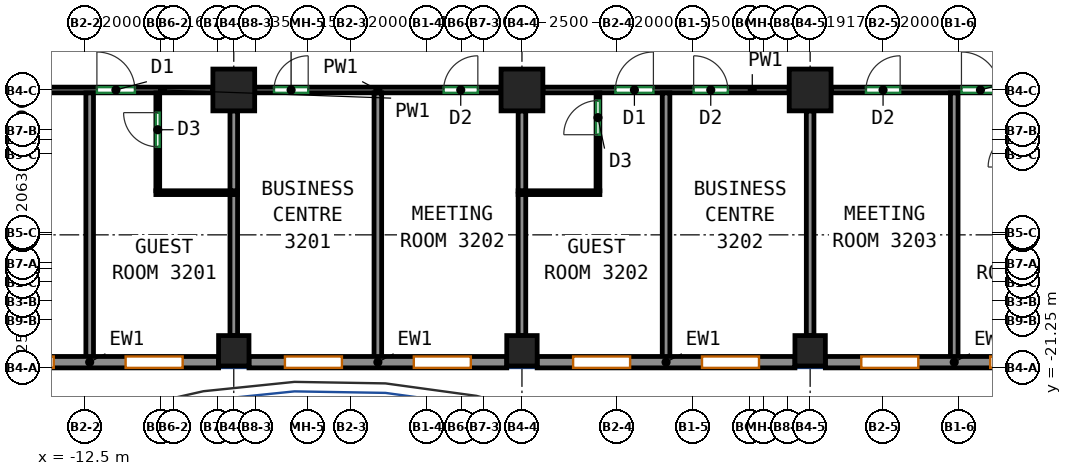
"""IFC4 building model, lengths in metres.
Left out: names, types, materials, properties, quantities, classifications, styles, units other than length and angle.
Written with IfcOpenShell. Run it as: python <this file> out.ifc"""

import sys

from ifc_helpers import new_model, si_unit, direction, frame, frame_2d, origin, origin_2d, place, context, subcontext, project, spatial, rectangle, extrude, source, transform, mapped, element, fill, save


model = new_model("IFC4")
c1 = context("Model", 3, precision=1e-05, world=origin(), true_north=direction((0.0, 1.0)))
c2 = subcontext(c1, "Body", "Model", "MODEL_VIEW")
j1 = project(units=[si_unit("LENGTHUNIT", "METRE"), si_unit("PLANEANGLEUNIT", "RADIAN")], contexts=[c1])
p1 = place(None, origin())
s1 = spatial("IfcSite", under=j1, at=p1, CompositionType="ELEMENT")
p2 = place(p1, origin())
s2 = spatial("IfcBuilding", under=s1, at=p2, CompositionType="ELEMENT")
p3 = place(p2, frame((0.0, 0.0, 143.9)))
s3 = spatial("IfcBuildingStorey", under=s2, at=p3, CompositionType="ELEMENT", Elevation=143.9)
m1 = source(origin(), c2, "Body", "SweptSolid", [
    extrude(rectangle(XDim=0.8, YDim=0.8, at=origin_2d()), origin(), (0.0, 0.0, 1.0), 3.12),
])
p4 = place(p3, frame((-8.583, -20.8, 0.0), z_axis=(0.0, 0.0, 1.0), x_axis=(1.0, 0.0, 0.0)))
e1 = element("IfcColumn", 1, at=p4, inside=s3, PredefinedType="COLUMN", context=c2, shape_type="MappedRepresentation", body=[
    mapped(m1, transform((0.0, 0.0, 0.0))),
])
m2 = source(origin(), c2, "Body", "SweptSolid", [
    extrude(rectangle(XDim=1.1, YDim=1.1, at=origin_2d()), origin(), (0.0, 0.0, 1.0), 3.12),
])
p5 = place(p3, frame((-8.583, -13.938, 0.0), z_axis=(0.0, 0.0, 1.0), x_axis=(1.0, 0.0, 0.0)))
e2 = element("IfcColumn", 2, at=p5, inside=s3, PredefinedType="COLUMN", context=c2, shape_type="MappedRepresentation", body=[
    mapped(m2, transform((0.0, 0.0, 0.0))),
])
p6 = place(p3, frame((-1.0, -20.8, 0.0), z_axis=(0.0, 0.0, 1.0), x_axis=(1.0, 0.0, 0.0)))
e3 = element("IfcColumn", 3, at=p6, inside=s3, PredefinedType="COLUMN", context=c2, shape_type="MappedRepresentation", body=[
    mapped(m1, transform((0.0, 0.0, 0.0))),
])
p7 = place(p3, frame((-1.0, -13.938, 0.0), z_axis=(0.0, 0.0, 1.0), x_axis=(1.0, 0.0, 0.0)))
e4 = element("IfcColumn", 4, at=p7, inside=s3, PredefinedType="COLUMN", context=c2, shape_type="MappedRepresentation", body=[
    mapped(m2, transform((0.0, 0.0, 0.0))),
])
p8 = place(p3, frame((6.583, -20.8, 0.0), z_axis=(0.0, 0.0, 1.0), x_axis=(1.0, 0.0, 0.0)))
e5 = element("IfcColumn", 5, at=p8, inside=s3, PredefinedType="COLUMN", context=c2, shape_type="MappedRepresentation", body=[
    mapped(m1, transform((0.0, 0.0, 0.0))),
])
p9 = place(p3, frame((6.583, -13.938, 0.0), z_axis=(0.0, 0.0, 1.0), x_axis=(1.0, 0.0, 0.0)))
e6 = element("IfcColumn", 6, at=p9, inside=s3, PredefinedType="COLUMN", context=c2, shape_type="MappedRepresentation", body=[
    mapped(m2, transform((0.0, 0.0, 0.0))),
])
m3 = source(origin(), c2, "Body", "SweptSolid", [
    extrude(rectangle(XDim=6.783, YDim=0.3, at=frame_2d((3.392, 0.0))), origin(), (0.0, 0.0, 1.0), 3.12),
])
p10 = place(p3, frame((-15.767, -21.1, 0.0), z_axis=(0.0, 0.0, 1.0), x_axis=(1.0, 0.0, 0.0)))
e7 = element("IfcWall", 7, at=p10, inside=s3, PredefinedType="SOLIDWALL", context=c2, shape_type="MappedRepresentation", body=[
    mapped(m3, transform((0.0, 0.0, 0.0))),
])
p11 = place(p10, frame((0.946, 0.0, 0.85)))
e8 = element("IfcOpeningElement", 8, at=p11, cuts=e7, PredefinedType="OPENING", context=c2, shape_type="SweptSolid", body=[
    extrude(rectangle(XDim=1.5, YDim=1.95, at=frame_2d((0.75, 0.975))), frame((0.0, 0.16, 0.0), z_axis=(0.0, -1.0, 0.0), x_axis=(1.0, 0.0, 0.0)), (0.0, 0.0, 1.0), 0.32),
])
p12 = place(p10, frame((4.338, 0.0, 0.85)))
e9 = element("IfcOpeningElement", 9, at=p12, cuts=e7, PredefinedType="OPENING", context=c2, shape_type="SweptSolid", body=[
    extrude(rectangle(XDim=1.5, YDim=1.95, at=frame_2d((0.75, 0.975))), frame((0.0, 0.16, 0.0), z_axis=(0.0, -1.0, 0.0), x_axis=(1.0, 0.0, 0.0)), (0.0, 0.0, 1.0), 0.32),
])
m4 = source(origin(), c2, "Body", "SweptSolid", [
    extrude(rectangle(XDim=6.783, YDim=0.3, at=frame_2d((3.392, 0.0))), origin(), (0.0, 0.0, 1.0), 3.12),
])
p13 = place(p3, frame((-8.183, -21.1, 0.0), z_axis=(0.0, 0.0, 1.0), x_axis=(1.0, 0.0, 0.0)))
e10 = element("IfcWall", 10, at=p13, inside=s3, PredefinedType="SOLIDWALL", context=c2, shape_type="MappedRepresentation", body=[
    mapped(m4, transform((0.0, 0.0, 0.0))),
])
p14 = place(p13, frame((0.946, 0.0, 0.85)))
e11 = element("IfcOpeningElement", 11, at=p14, cuts=e10, PredefinedType="OPENING", context=c2, shape_type="SweptSolid", body=[
    extrude(rectangle(XDim=1.5, YDim=1.95, at=frame_2d((0.75, 0.975))), frame((0.0, 0.16, 0.0), z_axis=(0.0, -1.0, 0.0), x_axis=(1.0, 0.0, 0.0)), (0.0, 0.0, 1.0), 0.32),
])
p15 = place(p13, frame((4.337, 0.0, 0.85)))
e12 = element("IfcOpeningElement", 12, at=p15, cuts=e10, PredefinedType="OPENING", context=c2, shape_type="SweptSolid", body=[
    extrude(rectangle(XDim=1.5, YDim=1.95, at=frame_2d((0.75, 0.975))), frame((0.0, 0.16, 0.0), z_axis=(0.0, -1.0, 0.0), x_axis=(1.0, 0.0, 0.0)), (0.0, 0.0, 1.0), 0.32),
])
p16 = place(p3, frame((-0.6, -21.1, 0.0), z_axis=(0.0, 0.0, 1.0), x_axis=(1.0, 0.0, 0.0)))
e13 = element("IfcWall", 13, at=p16, inside=s3, PredefinedType="SOLIDWALL", context=c2, shape_type="MappedRepresentation", body=[
    mapped(m4, transform((0.0, 0.0, 0.0))),
])
p17 = place(p16, frame((0.946, 0.0, 0.85)))
e14 = element("IfcOpeningElement", 14, at=p17, cuts=e13, PredefinedType="OPENING", context=c2, shape_type="SweptSolid", body=[
    extrude(rectangle(XDim=1.5, YDim=1.95, at=frame_2d((0.75, 0.975))), frame((0.0, 0.16, 0.0), z_axis=(0.0, -1.0, 0.0), x_axis=(1.0, 0.0, 0.0)), (0.0, 0.0, 1.0), 0.32),
])
p18 = place(p16, frame((4.337, 0.0, 0.85)))
e15 = element("IfcOpeningElement", 15, at=p18, cuts=e13, PredefinedType="OPENING", context=c2, shape_type="SweptSolid", body=[
    extrude(rectangle(XDim=1.5, YDim=1.95, at=frame_2d((0.75, 0.975))), frame((0.0, 0.16, 0.0), z_axis=(0.0, -1.0, 0.0), x_axis=(1.0, 0.0, 0.0)), (0.0, 0.0, 1.0), 0.32),
])
p19 = place(p3, frame((6.983, -21.1, 0.0), z_axis=(0.0, 0.0, 1.0), x_axis=(1.0, 0.0, 0.0)))
e16 = element("IfcWall", 16, at=p19, inside=s3, PredefinedType="SOLIDWALL", context=c2, shape_type="MappedRepresentation", body=[
    mapped(m3, transform((0.0, 0.0, 0.0))),
])
p20 = place(p19, frame((0.946, 0.0, 0.85)))
e17 = element("IfcOpeningElement", 17, at=p20, cuts=e16, PredefinedType="OPENING", context=c2, shape_type="SweptSolid", body=[
    extrude(rectangle(XDim=1.5, YDim=1.95, at=frame_2d((0.75, 0.975))), frame((0.0, 0.16, 0.0), z_axis=(0.0, -1.0, 0.0), x_axis=(1.0, 0.0, 0.0)), (0.0, 0.0, 1.0), 0.32),
])
p21 = place(p19, frame((4.338, 0.0, 0.85)))
e18 = element("IfcOpeningElement", 18, at=p21, cuts=e16, PredefinedType="OPENING", context=c2, shape_type="SweptSolid", body=[
    extrude(rectangle(XDim=1.5, YDim=1.95, at=frame_2d((0.75, 0.975))), frame((0.0, 0.16, 0.0), z_axis=(0.0, -1.0, 0.0), x_axis=(1.0, 0.0, 0.0)), (0.0, 0.0, 1.0), 0.32),
])
p22 = place(p3, frame((-13.55, -13.938, 0.0), z_axis=(0.0, 0.0, 1.0), x_axis=(1.0, 0.0, 0.0)))
e19 = element("IfcWall", 19, at=p22, inside=s3, PredefinedType="PARTITIONING", context=c2, shape_type="SweptSolid", body=[
    extrude(rectangle(XDim=4.417, YDim=0.15, at=frame_2d((2.208, 0.0))), origin(), (0.0, 0.0, 1.0), 3.12),
])
p23 = place(p22, frame((1.365, 0.0, 0.0)))
e20 = element("IfcOpeningElement", 20, at=p23, cuts=e19, PredefinedType="OPENING", context=c2, shape_type="SweptSolid", body=[
    extrude(rectangle(XDim=1.0, YDim=2.1, at=frame_2d((0.5, 1.05))), frame((0.0, 0.085, 0.0), z_axis=(0.0, -1.0, 0.0), x_axis=(1.0, 0.0, 0.0)), (0.0, 0.0, 1.0), 0.17),
])
p24 = place(p3, frame((-8.033, -13.938, 0.0), z_axis=(0.0, 0.0, 1.0), x_axis=(1.0, 0.0, 0.0)))
e21 = element("IfcWall", 21, at=p24, inside=s3, PredefinedType="PARTITIONING", context=c2, shape_type="SweptSolid", body=[
    extrude(rectangle(XDim=6.483, YDim=0.15, at=frame_2d((3.241, 0.0))), origin(), (0.0, 0.0, 1.0), 3.12),
])
p25 = place(p24, frame((0.508, 0.0, 0.0)))
e22 = element("IfcOpeningElement", 22, at=p25, cuts=e21, PredefinedType="OPENING", context=c2, shape_type="SweptSolid", body=[
    extrude(rectangle(XDim=0.9, YDim=2.1, at=frame_2d((0.45, 1.05))), frame((0.0, 0.085, 0.0), z_axis=(0.0, -1.0, 0.0), x_axis=(1.0, 0.0, 0.0)), (0.0, 0.0, 1.0), 0.17),
])
p26 = place(p24, frame((4.972, 0.0, 0.0)))
e23 = element("IfcOpeningElement", 23, at=p26, cuts=e21, PredefinedType="OPENING", context=c2, shape_type="SweptSolid", body=[
    extrude(rectangle(XDim=0.9, YDim=2.1, at=frame_2d((0.45, 1.05))), frame((0.0, 0.085, 0.0), z_axis=(0.0, -1.0, 0.0), x_axis=(1.0, 0.0, 0.0)), (0.0, 0.0, 1.0), 0.17),
])
p27 = place(p3, frame((-0.45, -13.938, 0.0), z_axis=(0.0, 0.0, 1.0), x_axis=(1.0, 0.0, 0.0)))
e24 = element("IfcWall", 24, at=p27, inside=s3, PredefinedType="PARTITIONING", context=c2, shape_type="SweptSolid", body=[
    extrude(rectangle(XDim=6.483, YDim=0.15, at=frame_2d((3.241, 0.0))), origin(), (0.0, 0.0, 1.0), 3.12),
])
p28 = place(p27, frame((1.909, 0.0, 0.0)))
e25 = element("IfcOpeningElement", 25, at=p28, cuts=e24, PredefinedType="OPENING", context=c2, shape_type="SweptSolid", body=[
    extrude(rectangle(XDim=1.0, YDim=2.1, at=frame_2d((0.5, 1.05))), frame((0.0, 0.085, 0.0), z_axis=(0.0, -1.0, 0.0), x_axis=(1.0, 0.0, 0.0)), (0.0, 0.0, 1.0), 0.17),
])
p29 = place(p27, frame((3.968, 0.0, 0.0)))
e26 = element("IfcOpeningElement", 26, at=p29, cuts=e24, PredefinedType="OPENING", context=c2, shape_type="SweptSolid", body=[
    extrude(rectangle(XDim=0.9, YDim=2.1, at=frame_2d((0.45, 1.05))), frame((0.0, 0.085, 0.0), z_axis=(0.0, -1.0, 0.0), x_axis=(1.0, 0.0, 0.0)), (0.0, 0.0, 1.0), 0.17),
])
p30 = place(p3, frame((7.133, -13.938, 0.0), z_axis=(0.0, 0.0, 1.0), x_axis=(1.0, 0.0, 0.0)))
e27 = element("IfcWall", 27, at=p30, inside=s3, PredefinedType="PARTITIONING", context=c2, shape_type="SweptSolid", body=[
    extrude(rectangle(XDim=6.484, YDim=0.15, at=frame_2d((3.242, 0.0))), origin(), (0.0, 0.0, 1.0), 3.12),
])
p31 = place(p30, frame((0.919, 0.0, 0.0)))
e28 = element("IfcOpeningElement", 28, at=p31, cuts=e27, PredefinedType="OPENING", context=c2, shape_type="SweptSolid", body=[
    extrude(rectangle(XDim=0.9, YDim=2.1, at=frame_2d((0.45, 1.05))), frame((0.0, 0.085, 0.0), z_axis=(0.0, -1.0, 0.0), x_axis=(1.0, 0.0, 0.0)), (0.0, 0.0, 1.0), 0.17),
])
p32 = place(p30, frame((3.432, 0.0, 0.0)))
e29 = element("IfcOpeningElement", 29, at=p32, cuts=e27, PredefinedType="OPENING", context=c2, shape_type="SweptSolid", body=[
    extrude(rectangle(XDim=1.0, YDim=2.1, at=frame_2d((0.5, 1.05))), frame((0.0, 0.085, 0.0), z_axis=(0.0, -1.0, 0.0), x_axis=(1.0, 0.0, 0.0)), (0.0, 0.0, 1.0), 0.17),
])
p33 = place(p3, frame((-12.375, -21.0, 0.0), z_axis=(0.0, 0.0, 1.0), x_axis=(0.0, 1.0, 0.0)))
e30 = element("IfcWall", 30, at=p33, inside=s3, PredefinedType="PARTITIONING", context=c2, shape_type="SweptSolid", body=[
    extrude(rectangle(XDim=6.985, YDim=0.2, at=frame_2d((3.493, 0.0))), origin(), (0.0, 0.0, 1.0), 3.12),
])
p34 = place(p3, frame((-10.583, -16.59, 0.0), z_axis=(0.0, 0.0, 1.0), x_axis=(0.0, 1.0, 0.0)))
e31 = element("IfcWall", 31, at=p34, inside=s3, PredefinedType="PARTITIONING", context=c2, shape_type="SweptSolid", body=[
    extrude(rectangle(XDim=2.575, YDim=0.1, at=frame_2d((1.288, 0.0))), origin(), (0.0, 0.0, 1.0), 3.12),
])
p35 = place(p34, frame((1.156, 0.0, 0.0)))
e32 = element("IfcOpeningElement", 32, at=p35, cuts=e31, PredefinedType="OPENING", context=c2, shape_type="SweptSolid", body=[
    extrude(rectangle(XDim=0.9, YDim=2.1, at=frame_2d((0.45, 1.05))), frame((0.0, 0.06, 0.0), z_axis=(0.0, -1.0, 0.0), x_axis=(1.0, 0.0, 0.0)), (0.0, 0.0, 1.0), 0.12),
])
p36 = place(p3, frame((-10.633, -16.64, 0.0), z_axis=(0.0, 0.0, 1.0), x_axis=(1.0, 0.0, 0.0)))
e33 = element("IfcWall", 33, at=p36, inside=s3, PredefinedType="PARTITIONING", context=c2, shape_type="SweptSolid", body=[
    extrude(rectangle(XDim=2.15, YDim=0.1, at=frame_2d((1.075, 0.0))), origin(), (0.0, 0.0, 1.0), 3.12),
])
p37 = place(p3, frame((-8.583, -20.4, 0.0), z_axis=(0.0, 0.0, 1.0), x_axis=(0.0, 1.0, 0.0)))
e34 = element("IfcWall", 34, at=p37, inside=s3, PredefinedType="PARTITIONING", context=c2, shape_type="SweptSolid", body=[
    extrude(rectangle(XDim=3.71, YDim=0.2, at=frame_2d((1.855, 0.0))), origin(), (0.0, 0.0, 1.0), 3.12),
])
p38 = place(p3, frame((-8.583, -16.59, 0.0), z_axis=(0.0, 0.0, 1.0), x_axis=(0.0, 1.0, 0.0)))
e35 = element("IfcWall", 35, at=p38, inside=s3, PredefinedType="PARTITIONING", context=c2, shape_type="SweptSolid", body=[
    extrude(rectangle(XDim=2.102, YDim=0.2, at=frame_2d((1.051, 0.0))), origin(), (0.0, 0.0, 1.0), 3.12),
])
p39 = place(p3, frame((-4.792, -21.0, 0.0), z_axis=(0.0, 0.0, 1.0), x_axis=(0.0, 1.0, 0.0)))
e36 = element("IfcWall", 36, at=p39, inside=s3, PredefinedType="PARTITIONING", context=c2, shape_type="SweptSolid", body=[
    extrude(rectangle(XDim=6.985, YDim=0.2, at=frame_2d((3.493, 0.0))), origin(), (0.0, 0.0, 1.0), 3.12),
])
p40 = place(p3, frame((-1.0, -20.4, 0.0), z_axis=(0.0, 0.0, 1.0), x_axis=(0.0, 1.0, 0.0)))
e37 = element("IfcWall", 37, at=p40, inside=s3, PredefinedType="PARTITIONING", context=c2, shape_type="SweptSolid", body=[
    extrude(rectangle(XDim=3.72, YDim=0.2, at=frame_2d((1.86, 0.0))), origin(), (0.0, 0.0, 1.0), 3.12),
])
p41 = place(p3, frame((-1.0, -16.6, 0.0), z_axis=(0.0, 0.0, 1.0), x_axis=(0.0, 1.0, 0.0)))
e38 = element("IfcWall", 38, at=p41, inside=s3, PredefinedType="PARTITIONING", context=c2, shape_type="SweptSolid", body=[
    extrude(rectangle(XDim=2.112, YDim=0.2, at=frame_2d((1.056, 0.0))), origin(), (0.0, 0.0, 1.0), 3.12),
])
p42 = place(p3, frame((1.0, -16.59, 0.0), z_axis=(0.0, 0.0, 1.0), x_axis=(0.0, 1.0, 0.0)))
e39 = element("IfcWall", 39, at=p42, inside=s3, PredefinedType="PARTITIONING", context=c2, shape_type="SweptSolid", body=[
    extrude(rectangle(XDim=2.575, YDim=0.1, at=frame_2d((1.288, 0.0))), origin(), (0.0, 0.0, 1.0), 3.12),
])
p43 = place(p42, frame((1.475, 0.0, 0.0)))
e40 = element("IfcOpeningElement", 40, at=p43, cuts=e39, PredefinedType="OPENING", context=c2, shape_type="SweptSolid", body=[
    extrude(rectangle(XDim=0.9, YDim=2.1, at=frame_2d((0.45, 1.05))), frame((0.0, 0.06, 0.0), z_axis=(0.0, -1.0, 0.0), x_axis=(1.0, 0.0, 0.0)), (0.0, 0.0, 1.0), 0.12),
])
p44 = place(p3, frame((-1.1, -16.64, 0.0), z_axis=(0.0, 0.0, 1.0), x_axis=(1.0, 0.0, 0.0)))
e41 = element("IfcWall", 41, at=p44, inside=s3, PredefinedType="PARTITIONING", context=c2, shape_type="SweptSolid", body=[
    extrude(rectangle(XDim=2.15, YDim=0.1, at=frame_2d((1.075, 0.0))), origin(), (0.0, 0.0, 1.0), 3.12),
])
p45 = place(p3, frame((2.792, -21.0, 0.0), z_axis=(0.0, 0.0, 1.0), x_axis=(0.0, 1.0, 0.0)))
e42 = element("IfcWall", 42, at=p45, inside=s3, PredefinedType="PARTITIONING", context=c2, shape_type="SweptSolid", body=[
    extrude(rectangle(XDim=6.985, YDim=0.2, at=frame_2d((3.493, 0.0))), origin(), (0.0, 0.0, 1.0), 3.12),
])
p46 = place(p3, frame((6.583, -20.4, 0.0), z_axis=(0.0, 0.0, 1.0), x_axis=(0.0, 1.0, 0.0)))
e43 = element("IfcWall", 43, at=p46, inside=s3, PredefinedType="PARTITIONING", context=c2, shape_type="SweptSolid", body=[
    extrude(rectangle(XDim=5.912, YDim=0.2, at=frame_2d((2.956, 0.0))), origin(), (0.0, 0.0, 1.0), 3.12),
])
p47 = place(p3, frame((10.375, -21.0, 0.0), z_axis=(0.0, 0.0, 1.0), x_axis=(0.0, 1.0, 0.0)))
e44 = element("IfcWall", 44, at=p47, inside=s3, PredefinedType="PARTITIONING", context=c2, shape_type="SweptSolid", body=[
    extrude(rectangle(XDim=6.985, YDim=0.2, at=frame_2d((3.493, 0.0))), origin(), (0.0, 0.0, 1.0), 3.12),
])
p48 = place(p11, origin())
e45 = element("IfcWindow", 45, at=p48, inside=s3, PartitioningType="SINGLE_PANEL", PredefinedType="WINDOW", context=c2, shape_type="SweptSolid", body=[
    extrude(rectangle(XDim=1.5, YDim=1.95, at=frame_2d((0.75, 0.975))), frame((0.0, 0.03, 0.0), z_axis=(0.0, -1.0, 0.0), x_axis=(1.0, 0.0, 0.0)), (0.0, 0.0, 1.0), 0.06),
])
fill(e8, e45)
p49 = place(p12, origin())
e46 = element("IfcWindow", 46, at=p49, inside=s3, PartitioningType="SINGLE_PANEL", PredefinedType="WINDOW", context=c2, shape_type="SweptSolid", body=[
    extrude(rectangle(XDim=1.5, YDim=1.95, at=frame_2d((0.75, 0.975))), frame((0.0, 0.03, 0.0), z_axis=(0.0, -1.0, 0.0), x_axis=(1.0, 0.0, 0.0)), (0.0, 0.0, 1.0), 0.06),
])
fill(e9, e46)
p50 = place(p14, origin())
e47 = element("IfcWindow", 47, at=p50, inside=s3, PartitioningType="SINGLE_PANEL", PredefinedType="WINDOW", context=c2, shape_type="SweptSolid", body=[
    extrude(rectangle(XDim=1.5, YDim=1.95, at=frame_2d((0.75, 0.975))), frame((0.0, 0.03, 0.0), z_axis=(0.0, -1.0, 0.0), x_axis=(1.0, 0.0, 0.0)), (0.0, 0.0, 1.0), 0.06),
])
fill(e11, e47)
p51 = place(p15, origin())
e48 = element("IfcWindow", 48, at=p51, inside=s3, PartitioningType="SINGLE_PANEL", PredefinedType="WINDOW", context=c2, shape_type="SweptSolid", body=[
    extrude(rectangle(XDim=1.5, YDim=1.95, at=frame_2d((0.75, 0.975))), frame((0.0, 0.03, 0.0), z_axis=(0.0, -1.0, 0.0), x_axis=(1.0, 0.0, 0.0)), (0.0, 0.0, 1.0), 0.06),
])
fill(e12, e48)
p52 = place(p17, origin())
e49 = element("IfcWindow", 49, at=p52, inside=s3, PartitioningType="SINGLE_PANEL", PredefinedType="WINDOW", context=c2, shape_type="SweptSolid", body=[
    extrude(rectangle(XDim=1.5, YDim=1.95, at=frame_2d((0.75, 0.975))), frame((0.0, 0.03, 0.0), z_axis=(0.0, -1.0, 0.0), x_axis=(1.0, 0.0, 0.0)), (0.0, 0.0, 1.0), 0.06),
])
fill(e14, e49)
p53 = place(p18, origin())
e50 = element("IfcWindow", 50, at=p53, inside=s3, PartitioningType="SINGLE_PANEL", PredefinedType="WINDOW", context=c2, shape_type="SweptSolid", body=[
    extrude(rectangle(XDim=1.5, YDim=1.95, at=frame_2d((0.75, 0.975))), frame((0.0, 0.03, 0.0), z_axis=(0.0, -1.0, 0.0), x_axis=(1.0, 0.0, 0.0)), (0.0, 0.0, 1.0), 0.06),
])
fill(e15, e50)
p54 = place(p20, origin())
e51 = element("IfcWindow", 51, at=p54, inside=s3, PartitioningType="SINGLE_PANEL", PredefinedType="WINDOW", context=c2, shape_type="SweptSolid", body=[
    extrude(rectangle(XDim=1.5, YDim=1.95, at=frame_2d((0.75, 0.975))), frame((0.0, 0.03, 0.0), z_axis=(0.0, -1.0, 0.0), x_axis=(1.0, 0.0, 0.0)), (0.0, 0.0, 1.0), 0.06),
])
fill(e17, e51)
p55 = place(p21, origin())
e52 = element("IfcWindow", 52, at=p55, inside=s3, PartitioningType="SINGLE_PANEL", PredefinedType="WINDOW", context=c2, shape_type="SweptSolid", body=[
    extrude(rectangle(XDim=1.5, YDim=1.95, at=frame_2d((0.75, 0.975))), frame((0.0, 0.03, 0.0), z_axis=(0.0, -1.0, 0.0), x_axis=(1.0, 0.0, 0.0)), (0.0, 0.0, 1.0), 0.06),
])
fill(e18, e52)
p56 = place(p35, origin())
e53 = element("IfcDoor", 53, at=p56, inside=s3, OperationType="SINGLE_SWING_RIGHT", PredefinedType="DOOR", context=c2, shape_type="SweptSolid", body=[
    extrude(rectangle(XDim=0.9, YDim=2.1, at=frame_2d((0.45, 1.05))), frame((0.0, 0.025, 0.0), z_axis=(0.0, -1.0, 0.0), x_axis=(1.0, 0.0, 0.0)), (0.0, 0.0, 1.0), 0.05),
])
fill(e32, e53)
p57 = place(p43, origin())
e54 = element("IfcDoor", 54, at=p57, inside=s3, OperationType="SINGLE_SWING_LEFT", PredefinedType="DOOR", context=c2, shape_type="SweptSolid", body=[
    extrude(rectangle(XDim=0.9, YDim=2.1, at=frame_2d((0.45, 1.05))), frame((0.0, 0.025, 0.0), z_axis=(0.0, -1.0, 0.0), x_axis=(1.0, 0.0, 0.0)), (0.0, 0.0, 1.0), 0.05),
])
fill(e40, e54)
p58 = place(p23, origin())
e55 = element("IfcDoor", 55, at=p58, inside=s3, OperationType="SINGLE_SWING_LEFT", PredefinedType="DOOR", context=c2, shape_type="SweptSolid", body=[
    extrude(rectangle(XDim=1.0, YDim=2.1, at=frame_2d((0.5, 1.05))), frame((0.0, 0.025, 0.0), z_axis=(0.0, -1.0, 0.0), x_axis=(1.0, 0.0, 0.0)), (0.0, 0.0, 1.0), 0.05),
])
fill(e20, e55)
p59 = place(p25, origin())
e56 = element("IfcDoor", 56, at=p59, inside=s3, OperationType="SINGLE_SWING_RIGHT", PredefinedType="DOOR", context=c2, shape_type="SweptSolid", body=[
    extrude(rectangle(XDim=0.9, YDim=2.1, at=frame_2d((0.45, 1.05))), frame((0.0, 0.025, 0.0), z_axis=(0.0, -1.0, 0.0), x_axis=(1.0, 0.0, 0.0)), (0.0, 0.0, 1.0), 0.05),
])
fill(e22, e56)
p60 = place(p26, origin())
e57 = element("IfcDoor", 57, at=p60, inside=s3, OperationType="SINGLE_SWING_RIGHT", PredefinedType="DOOR", context=c2, shape_type="SweptSolid", body=[
    extrude(rectangle(XDim=0.9, YDim=2.1, at=frame_2d((0.45, 1.05))), frame((0.0, 0.025, 0.0), z_axis=(0.0, -1.0, 0.0), x_axis=(1.0, 0.0, 0.0)), (0.0, 0.0, 1.0), 0.05),
])
fill(e23, e57)
p61 = place(p28, origin())
e58 = element("IfcDoor", 58, at=p61, inside=s3, OperationType="SINGLE_SWING_RIGHT", PredefinedType="DOOR", context=c2, shape_type="SweptSolid", body=[
    extrude(rectangle(XDim=1.0, YDim=2.1, at=frame_2d((0.5, 1.05))), frame((0.0, 0.025, 0.0), z_axis=(0.0, -1.0, 0.0), x_axis=(1.0, 0.0, 0.0)), (0.0, 0.0, 1.0), 0.05),
])
fill(e25, e58)
p62 = place(p29, origin())
e59 = element("IfcDoor", 59, at=p62, inside=s3, OperationType="SINGLE_SWING_LEFT", PredefinedType="DOOR", context=c2, shape_type="SweptSolid", body=[
    extrude(rectangle(XDim=0.9, YDim=2.1, at=frame_2d((0.45, 1.05))), frame((0.0, 0.025, 0.0), z_axis=(0.0, -1.0, 0.0), x_axis=(1.0, 0.0, 0.0)), (0.0, 0.0, 1.0), 0.05),
])
fill(e26, e59)
p63 = place(p31, origin())
e60 = element("IfcDoor", 60, at=p63, inside=s3, OperationType="SINGLE_SWING_RIGHT", PredefinedType="DOOR", context=c2, shape_type="SweptSolid", body=[
    extrude(rectangle(XDim=0.9, YDim=2.1, at=frame_2d((0.45, 1.05))), frame((0.0, 0.025, 0.0), z_axis=(0.0, -1.0, 0.0), x_axis=(1.0, 0.0, 0.0)), (0.0, 0.0, 1.0), 0.05),
])
fill(e28, e60)
p64 = place(p32, origin())
e61 = element("IfcDoor", 61, at=p64, inside=s3, OperationType="SINGLE_SWING_LEFT", PredefinedType="DOOR", context=c2, shape_type="SweptSolid", body=[
    extrude(rectangle(XDim=1.0, YDim=2.1, at=frame_2d((0.5, 1.05))), frame((0.0, 0.025, 0.0), z_axis=(0.0, -1.0, 0.0), x_axis=(1.0, 0.0, 0.0)), (0.0, 0.0, 1.0), 0.05),
])
fill(e29, e61)
save(model, sys.argv[1])
